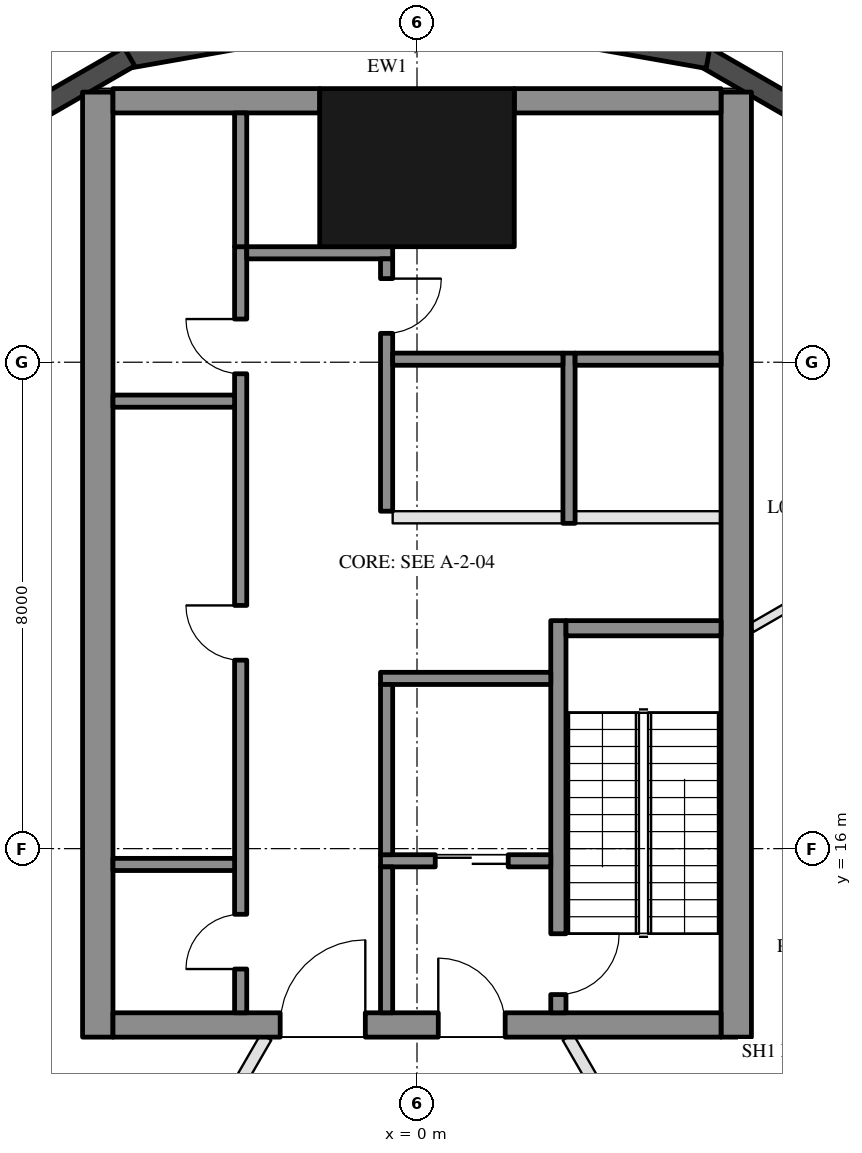
"""IFC4 building model, lengths in metres.
Left out: names, types, materials, properties, quantities, classifications, styles, units other than length and angle.
Written with IfcOpenShell. Run it as: python <this file> out.ifc"""

import sys

from ifc_helpers import new_model, si_unit, direction, frame, frame_2d, origin, origin_2d, place, context, subcontext, project, spatial, rectangle, hollow_rectangle, extrude, element, fill, save


model = new_model("IFC4")
c1 = context("Model", 3, precision=1e-05, world=origin(), true_north=direction((0.0, 1.0)))
c2 = subcontext(c1, "Body", "Model", "MODEL_VIEW")
j1 = project(units=[si_unit("LENGTHUNIT", "METRE"), si_unit("PLANEANGLEUNIT", "RADIAN")], contexts=[c1])
p1 = place(None, origin())
s1 = spatial("IfcSite", under=j1, at=p1, CompositionType="ELEMENT")
p2 = place(p1, origin())
s2 = spatial("IfcBuilding", under=s1, at=p2, CompositionType="ELEMENT")
p3 = place(p2, frame((0.0, 0.0, 23.5)))
s3 = spatial("IfcBuildingStorey", under=s2, at=p3, CompositionType="ELEMENT", Elevation=23.5)
p4 = place(p3, frame((0.0, 27.2, 0.0), z_axis=(0.0, 0.0, 1.0), x_axis=(1.0, 0.0, 0.0)))
e1 = element("IfcColumn", 1, at=p4, inside=s3, PredefinedType="COLUMN", context=c2, shape_type="SweptSolid", body=[
    extrude(hollow_rectangle(XDim=3.2, YDim=2.6, WallThickness=0.08, at=origin_2d()), origin(), (0.0, 0.0, 1.0), 5.0),
])
p5 = place(p3, frame((6.421, 28.048, 0.0), z_axis=(0.0, 0.0, 1.0), x_axis=(-0.866027425724, 0.499996497882, 0.0)))
e2 = element("IfcWall", 2, at=p5, inside=s3, PredefinedType="SOLIDWALL", context=c2, shape_type="SweptSolid", body=[
    extrude(rectangle(XDim=1.954, YDim=0.35, at=frame_2d((0.977, 0.0))), origin(), (0.0, 0.0, 1.0), 4.7),
])
for number, where, z_axis, x_axis in (
    (3, (4.787, 29.004, 0.0), (0.0, 0.0, 1.0), (-0.985, 0.174, 0.0)),
    (4, (-2.863, 29.344, 0.0), (0.0, 0.0, 1.0), (-0.985, -0.174, 0.0)),
):
    element("IfcWall", number, at=place(p3, frame(where, z_axis=z_axis, x_axis=x_axis)), inside=s3, PredefinedType="SOLIDWALL", context=c2, shape_type="SweptSolid", body=[
        extrude(rectangle(XDim=1.954, YDim=0.35, at=frame_2d((0.977, 0.0))), origin(), (0.0, 0.0, 1.0), 4.7),
    ])
p6 = place(p3, frame((-4.729, 29.025, 0.0), z_axis=(0.0, 0.0, 1.0), x_axis=(-0.866027425724, -0.499996497882, 0.0)))
e5 = element("IfcWall", 5, at=p6, inside=s3, PredefinedType="SOLIDWALL", context=c2, shape_type="SweptSolid", body=[
    extrude(rectangle(XDim=1.954, YDim=0.35, at=frame_2d((0.977, 0.0))), origin(), (0.0, 0.0, 1.0), 4.7),
])
for number, where, z_axis, x_axis in (
    (6, (5.25, 12.9, 0.0), (0.0, 0.0, 1.0), (0.0, 1.0, 0.0)),
    (7, (-5.25, 12.9, 0.0), (0.0, 0.0, 1.0), (0.0, 1.0, 0.0)),
):
    element("IfcWall", number, at=place(p3, frame(where, z_axis=z_axis, x_axis=x_axis)), inside=s3, PredefinedType="SHEAR", context=c2, shape_type="SweptSolid", body=[
        extrude(rectangle(XDim=15.542, YDim=0.5, at=frame_2d((7.771, 0.0))), origin(), (0.0, 0.0, 1.0), 4.7),
    ])
p7 = place(p3, frame((5.0, 13.1, 0.0), z_axis=(0.0, 0.0, 1.0), x_axis=(-1.0, 0.0, 0.0)))
e8 = element("IfcWall", 8, at=p7, inside=s3, PredefinedType="SHEAR", context=c2, shape_type="SweptSolid", body=[
    extrude(rectangle(XDim=10.0, YDim=0.4, at=frame_2d((5.0, 0.0))), origin(), (0.0, 0.0, 1.0), 4.7),
])
p8 = place(p7, frame((3.55, 0.0, 0.0)))
e9 = element("IfcOpeningElement", 9, at=p8, cuts=e8, PredefinedType="OPENING", context=c2, shape_type="SweptSolid", body=[
    extrude(rectangle(XDim=1.1, YDim=2.1, at=frame_2d((0.55, 1.05))), frame((0.0, 0.21, 0.0), z_axis=(0.0, -1.0, 0.0), x_axis=(1.0, 0.0, 0.0)), (0.0, 0.0, 1.0), 0.42),
])
p9 = place(p7, frame((5.85, 0.0, 0.0)))
e10 = element("IfcOpeningElement", 10, at=p9, cuts=e8, PredefinedType="OPENING", context=c2, shape_type="SweptSolid", body=[
    extrude(rectangle(XDim=1.4, YDim=2.1, at=frame_2d((0.7, 1.05))), frame((0.0, 0.21, 0.0), z_axis=(0.0, -1.0, 0.0), x_axis=(1.0, 0.0, 0.0)), (0.0, 0.0, 1.0), 0.42),
])
for number, where, z_axis, x_axis in (
    (11, (-1.6, 28.3, 0.0), (0.0, 0.0, 1.0), (-1.0, 0.0, 0.0)),
    (12, (5.0, 28.3, 0.0), (0.0, 0.0, 1.0), (-1.0, 0.0, 0.0)),
):
    element("IfcWall", number, at=place(p3, frame(where, z_axis=z_axis, x_axis=x_axis)), inside=s3, PredefinedType="SHEAR", context=c2, shape_type="SweptSolid", body=[
        extrude(rectangle(XDim=3.4, YDim=0.4, at=frame_2d((1.7, 0.0))), origin(), (0.0, 0.0, 1.0), 4.7),
    ])
p10 = place(p3, frame((2.325, 13.3, 0.0), z_axis=(0.0, 0.0, 1.0), x_axis=(0.0, 1.0, 0.0)))
e13 = element("IfcWall", 13, at=p10, inside=s3, PredefinedType="SHEAR", context=c2, shape_type="SweptSolid", body=[
    extrude(rectangle(XDim=6.45, YDim=0.25, at=frame_2d((3.225, 0.0))), origin(), (0.0, 0.0, 1.0), 4.7),
])
p11 = place(p10, frame((0.3, 0.0, 0.0)))
e14 = element("IfcOpeningElement", 14, at=p11, cuts=e13, PredefinedType="OPENING", context=c2, shape_type="SweptSolid", body=[
    extrude(rectangle(XDim=1.0, YDim=2.1, at=frame_2d((0.5, 1.05))), frame((0.0, 0.135, 0.0), z_axis=(0.0, -1.0, 0.0), x_axis=(1.0, 0.0, 0.0)), (0.0, 0.0, 1.0), 0.27),
])
p12 = place(p3, frame((5.0, 19.625, 0.0), z_axis=(0.0, 0.0, 1.0), x_axis=(-1.0, 0.0, 0.0)))
e15 = element("IfcWall", 15, at=p12, inside=s3, PredefinedType="SHEAR", context=c2, shape_type="SweptSolid", body=[
    extrude(rectangle(XDim=2.55, YDim=0.25, at=frame_2d((1.275, 0.0))), origin(), (0.0, 0.0, 1.0), 4.7),
])
p13 = place(p3, frame((2.2, 18.8, 0.0), z_axis=(0.0, 0.0, 1.0), x_axis=(-1.0, 0.0, 0.0)))
e16 = element("IfcWall", 16, at=p13, inside=s3, PredefinedType="SHEAR", context=c2, shape_type="SweptSolid", body=[
    extrude(rectangle(XDim=2.8, YDim=0.2, at=frame_2d((1.4, 0.0))), origin(), (0.0, 0.0, 1.0), 4.7),
])
p14 = place(p3, frame((2.2, 15.8, 0.0), z_axis=(0.0, 0.0, 1.0), x_axis=(-1.0, 0.0, 0.0)))
e17 = element("IfcWall", 17, at=p14, inside=s3, PredefinedType="SHEAR", context=c2, shape_type="SweptSolid", body=[
    extrude(rectangle(XDim=2.8, YDim=0.2, at=frame_2d((1.4, 0.0))), origin(), (0.0, 0.0, 1.0), 4.7),
])
p15 = place(p14, frame((0.7, 0.0, 0.0)))
e18 = element("IfcOpeningElement", 18, at=p15, cuts=e17, PredefinedType="OPENING", context=c2, shape_type="SweptSolid", body=[
    extrude(rectangle(XDim=1.2, YDim=2.1, at=frame_2d((0.6, 1.05))), frame((0.0, 0.11, 0.0), z_axis=(0.0, -1.0, 0.0), x_axis=(1.0, 0.0, 0.0)), (0.0, 0.0, 1.0), 0.22),
])
p16 = place(p3, frame((-0.5, 15.9, 0.0), z_axis=(0.0, 0.0, 1.0), x_axis=(0.0, 1.0, 0.0)))
e19 = element("IfcWall", 19, at=p16, inside=s3, PredefinedType="SHEAR", context=c2, shape_type="SweptSolid", body=[
    extrude(rectangle(XDim=2.8, YDim=0.2, at=frame_2d((1.4, 0.0))), origin(), (0.0, 0.0, 1.0), 4.7),
])
p17 = place(p3, frame((-0.5, 13.3, 0.0), z_axis=(0.0, 0.0, 1.0), x_axis=(0.0, 1.0, 0.0)))
e20 = element("IfcWall", 20, at=p17, inside=s3, PredefinedType="SHEAR", context=c2, shape_type="SweptSolid", body=[
    extrude(rectangle(XDim=2.4, YDim=0.2, at=frame_2d((1.2, 0.0))), origin(), (0.0, 0.0, 1.0), 4.7),
])
p18 = place(p3, frame((-2.9, 13.3, 0.0), z_axis=(0.0, 0.0, 1.0), x_axis=(0.0, 1.0, 0.0)))
e21 = element("IfcWall", 21, at=p18, inside=s3, PredefinedType="SHEAR", context=c2, shape_type="SweptSolid", body=[
    extrude(rectangle(XDim=12.6, YDim=0.2, at=frame_2d((6.3, 0.0))), origin(), (0.0, 0.0, 1.0), 4.7),
])
p19 = place(p18, frame((0.72, 0.0, 0.0)))
e22 = element("IfcOpeningElement", 22, at=p19, cuts=e21, PredefinedType="OPENING", context=c2, shape_type="SweptSolid", body=[
    extrude(rectangle(XDim=0.9, YDim=2.1, at=frame_2d((0.45, 1.05))), frame((0.0, 0.11, 0.0), z_axis=(0.0, -1.0, 0.0), x_axis=(1.0, 0.0, 0.0)), (0.0, 0.0, 1.0), 0.22),
])
p20 = place(p18, frame((5.8, 0.0, 0.0)))
e23 = element("IfcOpeningElement", 23, at=p20, cuts=e21, PredefinedType="OPENING", context=c2, shape_type="SweptSolid", body=[
    extrude(rectangle(XDim=0.9, YDim=2.1, at=frame_2d((0.45, 1.05))), frame((0.0, 0.11, 0.0), z_axis=(0.0, -1.0, 0.0), x_axis=(1.0, 0.0, 0.0)), (0.0, 0.0, 1.0), 0.22),
])
p21 = place(p18, frame((10.51, 0.0, 0.0)))
e24 = element("IfcOpeningElement", 24, at=p21, cuts=e21, PredefinedType="OPENING", context=c2, shape_type="SweptSolid", body=[
    extrude(rectangle(XDim=0.9, YDim=2.1, at=frame_2d((0.45, 1.05))), frame((0.0, 0.11, 0.0), z_axis=(0.0, -1.0, 0.0), x_axis=(1.0, 0.0, 0.0)), (0.0, 0.0, 1.0), 0.22),
])
p22 = place(p3, frame((-0.4, 25.8, 0.0), z_axis=(0.0, 0.0, 1.0), x_axis=(-1.0, 0.0, 0.0)))
e25 = element("IfcWall", 25, at=p22, inside=s3, PredefinedType="SHEAR", context=c2, shape_type="SweptSolid", body=[
    extrude(rectangle(XDim=2.4, YDim=0.2, at=frame_2d((1.2, 0.0))), origin(), (0.0, 0.0, 1.0), 4.7),
])
p23 = place(p3, frame((-0.5, 21.55, 0.0), z_axis=(0.0, 0.0, 1.0), x_axis=(0.0, 1.0, 0.0)))
e26 = element("IfcWall", 26, at=p23, inside=s3, PredefinedType="SHEAR", context=c2, shape_type="SweptSolid", body=[
    extrude(rectangle(XDim=4.15, YDim=0.2, at=frame_2d((2.075, 0.0))), origin(), (0.0, 0.0, 1.0), 4.7),
])
p24 = place(p23, frame((2.925, 0.0, 0.0)))
e27 = element("IfcOpeningElement", 27, at=p24, cuts=e26, PredefinedType="OPENING", context=c2, shape_type="SweptSolid", body=[
    extrude(rectangle(XDim=0.9, YDim=2.1, at=frame_2d((0.45, 1.05))), frame((0.0, 0.11, 0.0), z_axis=(0.0, -1.0, 0.0), x_axis=(1.0, 0.0, 0.0)), (0.0, 0.0, 1.0), 0.22),
])
for number, where, z_axis, x_axis in (
    (28, (-3.0, 15.74, 0.0), (0.0, 0.0, 1.0), (-1.0, 0.0, 0.0)),
    (29, (-3.0, 23.36, 0.0), (0.0, 0.0, 1.0), (-1.0, 0.0, 0.0)),
):
    element("IfcWall", number, at=place(p3, frame(where, z_axis=z_axis, x_axis=x_axis)), inside=s3, PredefinedType="SHEAR", context=c2, shape_type="SweptSolid", body=[
        extrude(rectangle(XDim=2.0, YDim=0.2, at=frame_2d((1.0, 0.0))), origin(), (0.0, 0.0, 1.0), 4.7),
    ])
p25 = place(p3, frame((-2.9, 25.9, 0.0), z_axis=(0.0, 0.0, 1.0), x_axis=(0.0, 1.0, 0.0)))
e30 = element("IfcWall", 30, at=p25, inside=s3, PredefinedType="SHEAR", context=c2, shape_type="SweptSolid", body=[
    extrude(rectangle(XDim=2.2, YDim=0.2, at=frame_2d((1.1, 0.0))), origin(), (0.0, 0.0, 1.0), 4.7),
])
p26 = place(p3, frame((2.5, 21.35, 0.0), z_axis=(0.0, 0.0, 1.0), x_axis=(0.0, 1.0, 0.0)))
e31 = element("IfcWall", 31, at=p26, inside=s3, PredefinedType="SHEAR", context=c2, shape_type="SweptSolid", body=[
    extrude(rectangle(XDim=2.8, YDim=0.2, at=frame_2d((1.4, 0.0))), origin(), (0.0, 0.0, 1.0), 4.7),
])
p27 = place(p3, frame((5.0, 24.05, 0.0), z_axis=(0.0, 0.0, 1.0), x_axis=(-1.0, 0.0, 0.0)))
e32 = element("IfcWall", 32, at=p27, inside=s3, PredefinedType="SHEAR", context=c2, shape_type="SweptSolid", body=[
    extrude(rectangle(XDim=2.4, YDim=0.2, at=frame_2d((1.2, 0.0))), origin(), (0.0, 0.0, 1.0), 4.7),
])
p28 = place(p3, frame((2.4, 24.05, 0.0), z_axis=(0.0, 0.0, 1.0), x_axis=(-1.0, 0.0, 0.0)))
e33 = element("IfcWall", 33, at=p28, inside=s3, PredefinedType="SHEAR", context=c2, shape_type="SweptSolid", body=[
    extrude(rectangle(XDim=2.8, YDim=0.2, at=frame_2d((1.4, 0.0))), origin(), (0.0, 0.0, 1.0), 4.7),
])
p29 = place(p3, frame((5.0, 21.45, 0.0), z_axis=(0.0, 0.0, 1.0), x_axis=(-1.0, 0.0, 0.0)))
e34 = element("IfcWall", 34, at=p29, inside=s3, PredefinedType="PARTITIONING", context=c2, shape_type="SweptSolid", body=[
    extrude(rectangle(XDim=2.4, YDim=0.2, at=frame_2d((1.2, 0.0))), origin(), (0.0, 0.0, 1.0), 4.7),
])
p30 = place(p3, frame((2.4, 21.45, 0.0), z_axis=(0.0, 0.0, 1.0), x_axis=(-1.0, 0.0, 0.0)))
e35 = element("IfcWall", 35, at=p30, inside=s3, PredefinedType="PARTITIONING", context=c2, shape_type="SweptSolid", body=[
    extrude(rectangle(XDim=2.8, YDim=0.2, at=frame_2d((1.4, 0.0))), origin(), (0.0, 0.0, 1.0), 4.7),
])
p31 = place(p3, frame((13.748, 15.328, 0.0), z_axis=(0.0, 0.0, 1.0), x_axis=(-0.86602026553, -0.500008899612, 0.0)))
e36 = element("IfcWall", 36, at=p31, inside=s3, PredefinedType="SOLIDWALL", context=c2, shape_type="SweptSolid", body=[
    extrude(rectangle(XDim=10.87, YDim=0.2, at=frame_2d((5.435, 0.0))), origin(), (0.0, 0.0, 1.0), 4.7),
])
p32 = place(p3, frame((10.088, 22.279, 0.0), z_axis=(0.0, 0.0, 1.0), x_axis=(-0.866028269386, -0.4999950366, 0.0)))
e37 = element("IfcWall", 37, at=p32, inside=s3, PredefinedType="PARTITIONING", context=c2, shape_type="SweptSolid", body=[
    extrude(rectangle(XDim=5.298, YDim=0.15, at=frame_2d((2.649, 0.0))), origin(), (0.0, 0.0, 1.0), 4.1),
])
p33 = place(p32, frame((3.499, 0.0, 0.0)))
e38 = element("IfcOpeningElement", 38, at=p33, cuts=e37, PredefinedType="OPENING", context=c2, shape_type="SweptSolid", body=[
    extrude(rectangle(XDim=0.9, YDim=2.1, at=frame_2d((0.45, 1.05))), frame((0.0, 0.085, 0.0), z_axis=(0.0, -1.0, 0.0), x_axis=(1.0, 0.0, 0.0)), (0.0, 0.0, 1.0), 0.17),
])
p34 = place(p3, frame((12.413, -4.3, 0.0), z_axis=(0.0, 0.0, 1.0), x_axis=(-0.50000478328, 0.866022642139, 0.0)))
e39 = element("IfcWall", 39, at=p34, inside=s3, PredefinedType="PARTITIONING", context=c2, shape_type="SweptSolid", body=[
    extrude(rectangle(XDim=19.861, YDim=0.2, at=frame_2d((9.931, 0.0))), origin(), (0.0, 0.0, 1.0), 3.91),
])
p35 = place(p34, frame((1.134, 0.0, 0.0)))
e40 = element("IfcOpeningElement", 40, at=p35, cuts=e39, PredefinedType="OPENING", context=c2, shape_type="SweptSolid", body=[
    extrude(rectangle(XDim=1.8, YDim=2.4, at=frame_2d((0.9, 1.2))), frame((0.0, 0.11, 0.0), z_axis=(0.0, -1.0, 0.0), x_axis=(1.0, 0.0, 0.0)), (0.0, 0.0, 1.0), 0.22),
])
p36 = place(p34, frame((17.59, 0.0, 0.0)))
e41 = element("IfcOpeningElement", 41, at=p36, cuts=e39, PredefinedType="OPENING", context=c2, shape_type="SweptSolid", body=[
    extrude(rectangle(XDim=1.0, YDim=2.1, at=frame_2d((0.5, 1.05))), frame((0.0, 0.11, 0.0), z_axis=(0.0, -1.0, 0.0), x_axis=(1.0, 0.0, 0.0)), (0.0, 0.0, 1.0), 0.22),
])
p37 = place(p34, frame((13.23, 0.0, 0.0)))
e42 = element("IfcOpeningElement", 42, at=p37, cuts=e39, PredefinedType="OPENING", context=c2, shape_type="SweptSolid", body=[
    extrude(rectangle(XDim=1.8, YDim=2.1, at=frame_2d((0.9, 1.05))), frame((0.0, 0.11, 0.0), z_axis=(0.0, -1.0, 0.0), x_axis=(1.0, 0.0, 0.0)), (0.0, 0.0, 1.0), 0.22),
])
p38 = place(p34, frame((7.168, 0.0, 0.0)))
e43 = element("IfcOpeningElement", 43, at=p38, cuts=e39, PredefinedType="OPENING", context=c2, shape_type="SweptSolid", body=[
    extrude(rectangle(XDim=1.0, YDim=2.1, at=frame_2d((0.5, 1.05))), frame((0.0, 0.11, 0.0), z_axis=(0.0, -1.0, 0.0), x_axis=(1.0, 0.0, 0.0)), (0.0, 0.0, 1.0), 0.22),
])
p39 = place(p3, frame((-14.963, 13.835, 0.0), z_axis=(0.0, 0.0, 1.0), x_axis=(0.866020428917, -0.500008616625, 0.0)))
e44 = element("IfcWall", 44, at=p39, inside=s3, PredefinedType="PARTITIONING", context=c2, shape_type="SweptSolid", body=[
    extrude(rectangle(XDim=11.176, YDim=0.15, at=frame_2d((5.588, 0.0))), origin(), (0.0, 0.0, 1.0), 4.1),
])
p40 = place(p3, frame((-2.482, 12.9, 0.0), z_axis=(0.0, 0.0, 1.0), x_axis=(-0.50000478328, -0.866022642139, 0.0)))
e45 = element("IfcWall", 45, at=p40, inside=s3, PredefinedType="PARTITIONING", context=c2, shape_type="SweptSolid", body=[
    extrude(rectangle(XDim=19.861, YDim=0.2, at=frame_2d((9.931, 0.0))), origin(), (0.0, 0.0, 1.0), 3.91),
])
p41 = place(p40, frame((13.23, 0.0, 0.0)))
e46 = element("IfcOpeningElement", 46, at=p41, cuts=e45, PredefinedType="OPENING", context=c2, shape_type="SweptSolid", body=[
    extrude(rectangle(XDim=1.8, YDim=2.1, at=frame_2d((0.9, 1.05))), frame((0.0, 0.11, 0.0), z_axis=(0.0, -1.0, 0.0), x_axis=(1.0, 0.0, 0.0)), (0.0, 0.0, 1.0), 0.22),
])
p42 = place(p40, frame((2.234, 0.0, 0.0)))
e47 = element("IfcOpeningElement", 47, at=p42, cuts=e45, PredefinedType="OPENING", context=c2, shape_type="SweptSolid", body=[
    extrude(rectangle(XDim=1.0, YDim=2.1, at=frame_2d((0.5, 1.05))), frame((0.0, 0.11, 0.0), z_axis=(0.0, -1.0, 0.0), x_axis=(1.0, 0.0, 0.0)), (0.0, 0.0, 1.0), 0.22),
])
p43 = place(p40, frame((6.706, 0.0, 0.0)))
e48 = element("IfcOpeningElement", 48, at=p43, cuts=e45, PredefinedType="OPENING", context=c2, shape_type="SweptSolid", body=[
    extrude(rectangle(XDim=1.0, YDim=2.1, at=frame_2d((0.5, 1.05))), frame((0.0, 0.11, 0.0), z_axis=(0.0, -1.0, 0.0), x_axis=(1.0, 0.0, 0.0)), (0.0, 0.0, 1.0), 0.22),
])
p44 = place(p40, frame((9.943, 0.0, 0.0)))
e49 = element("IfcOpeningElement", 49, at=p44, cuts=e45, PredefinedType="OPENING", context=c2, shape_type="SweptSolid", body=[
    extrude(rectangle(XDim=1.0, YDim=2.1, at=frame_2d((0.5, 1.05))), frame((0.0, 0.11, 0.0), z_axis=(0.0, -1.0, 0.0), x_axis=(1.0, 0.0, 0.0)), (0.0, 0.0, 1.0), 0.22),
])
p45 = place(p40, frame((17.59, 0.0, 0.0)))
e50 = element("IfcOpeningElement", 50, at=p45, cuts=e45, PredefinedType="OPENING", context=c2, shape_type="SweptSolid", body=[
    extrude(rectangle(XDim=1.0, YDim=2.1, at=frame_2d((0.5, 1.05))), frame((0.0, 0.11, 0.0), z_axis=(0.0, -1.0, 0.0), x_axis=(1.0, 0.0, 0.0)), (0.0, 0.0, 1.0), 0.22),
])
p46 = place(p15, origin())
e51 = element("IfcDoor", 51, at=p46, inside=s3, OperationType="DOUBLE_DOOR_SLIDING", PredefinedType="DOOR", context=c2, shape_type="SweptSolid", body=[
    extrude(rectangle(XDim=1.2, YDim=2.1, at=frame_2d((0.6, 1.05))), frame((0.0, 0.025, 0.0), z_axis=(0.0, -1.0, 0.0), x_axis=(1.0, 0.0, 0.0)), (0.0, 0.0, 1.0), 0.05),
])
fill(e18, e51)
p47 = place(p19, origin())
e52 = element("IfcDoor", 52, at=p47, inside=s3, OperationType="SINGLE_SWING_LEFT", PredefinedType="DOOR", context=c2, shape_type="SweptSolid", body=[
    extrude(rectangle(XDim=0.9, YDim=2.1, at=frame_2d((0.45, 1.05))), frame((0.0, 0.025, 0.0), z_axis=(0.0, -1.0, 0.0), x_axis=(1.0, 0.0, 0.0)), (0.0, 0.0, 1.0), 0.05),
])
fill(e22, e52)
p48 = place(p20, origin())
e53 = element("IfcDoor", 53, at=p48, inside=s3, OperationType="SINGLE_SWING_RIGHT", PredefinedType="DOOR", context=c2, shape_type="SweptSolid", body=[
    extrude(rectangle(XDim=0.9, YDim=2.1, at=frame_2d((0.45, 1.05))), frame((0.0, 0.025, 0.0), z_axis=(0.0, -1.0, 0.0), x_axis=(1.0, 0.0, 0.0)), (0.0, 0.0, 1.0), 0.05),
])
fill(e23, e53)
p49 = place(p21, origin())
e54 = element("IfcDoor", 54, at=p49, inside=s3, OperationType="SINGLE_SWING_RIGHT", PredefinedType="DOOR", context=c2, shape_type="SweptSolid", body=[
    extrude(rectangle(XDim=0.9, YDim=2.1, at=frame_2d((0.45, 1.05))), frame((0.0, 0.025, 0.0), z_axis=(0.0, -1.0, 0.0), x_axis=(1.0, 0.0, 0.0)), (0.0, 0.0, 1.0), 0.05),
])
fill(e24, e54)
p50 = place(p24, frame((0.9, 0.0, 0.0), z_axis=(0.0, 0.0, 1.0), x_axis=(-1.0, 0.0, 0.0)))
e55 = element("IfcDoor", 55, at=p50, inside=s3, OperationType="SINGLE_SWING_LEFT", PredefinedType="DOOR", context=c2, shape_type="SweptSolid", body=[
    extrude(rectangle(XDim=0.9, YDim=2.1, at=frame_2d((0.45, 1.05))), frame((0.0, 0.025, 0.0), z_axis=(0.0, -1.0, 0.0), x_axis=(1.0, 0.0, 0.0)), (0.0, 0.0, 1.0), 0.05),
])
fill(e27, e55)
p51 = place(p8, frame((1.1, 0.0, 0.0), z_axis=(0.0, 0.0, 1.0), x_axis=(-1.0, 0.0, 0.0)))
e56 = element("IfcDoor", 56, at=p51, inside=s3, OperationType="SINGLE_SWING_LEFT", PredefinedType="DOOR", context=c2, shape_type="SweptSolid", body=[
    extrude(rectangle(XDim=1.1, YDim=2.1, at=frame_2d((0.55, 1.05))), frame((0.0, 0.025, 0.0), z_axis=(0.0, -1.0, 0.0), x_axis=(1.0, 0.0, 0.0)), (0.0, 0.0, 1.0), 0.05),
])
fill(e9, e56)
p52 = place(p9, frame((1.4, 0.0, 0.0), z_axis=(0.0, 0.0, 1.0), x_axis=(-1.0, 0.0, 0.0)))
e57 = element("IfcDoor", 57, at=p52, inside=s3, OperationType="DOUBLE_DOOR_SINGLE_SWING", PredefinedType="DOOR", context=c2, shape_type="SweptSolid", body=[
    extrude(rectangle(XDim=1.4, YDim=2.1, at=frame_2d((0.7, 1.05))), frame((0.0, 0.025, 0.0), z_axis=(0.0, -1.0, 0.0), x_axis=(1.0, 0.0, 0.0)), (0.0, 0.0, 1.0), 0.05),
])
fill(e10, e57)
p53 = place(p11, frame((1.0, 0.0, 0.0), z_axis=(0.0, 0.0, 1.0), x_axis=(-1.0, 0.0, 0.0)))
e58 = element("IfcDoor", 58, at=p53, inside=s3, OperationType="SINGLE_SWING_LEFT", PredefinedType="DOOR", context=c2, shape_type="SweptSolid", body=[
    extrude(rectangle(XDim=1.0, YDim=2.1, at=frame_2d((0.5, 1.05))), frame((0.0, 0.025, 0.0), z_axis=(0.0, -1.0, 0.0), x_axis=(1.0, 0.0, 0.0)), (0.0, 0.0, 1.0), 0.05),
])
fill(e14, e58)
save(model, sys.argv[1])
